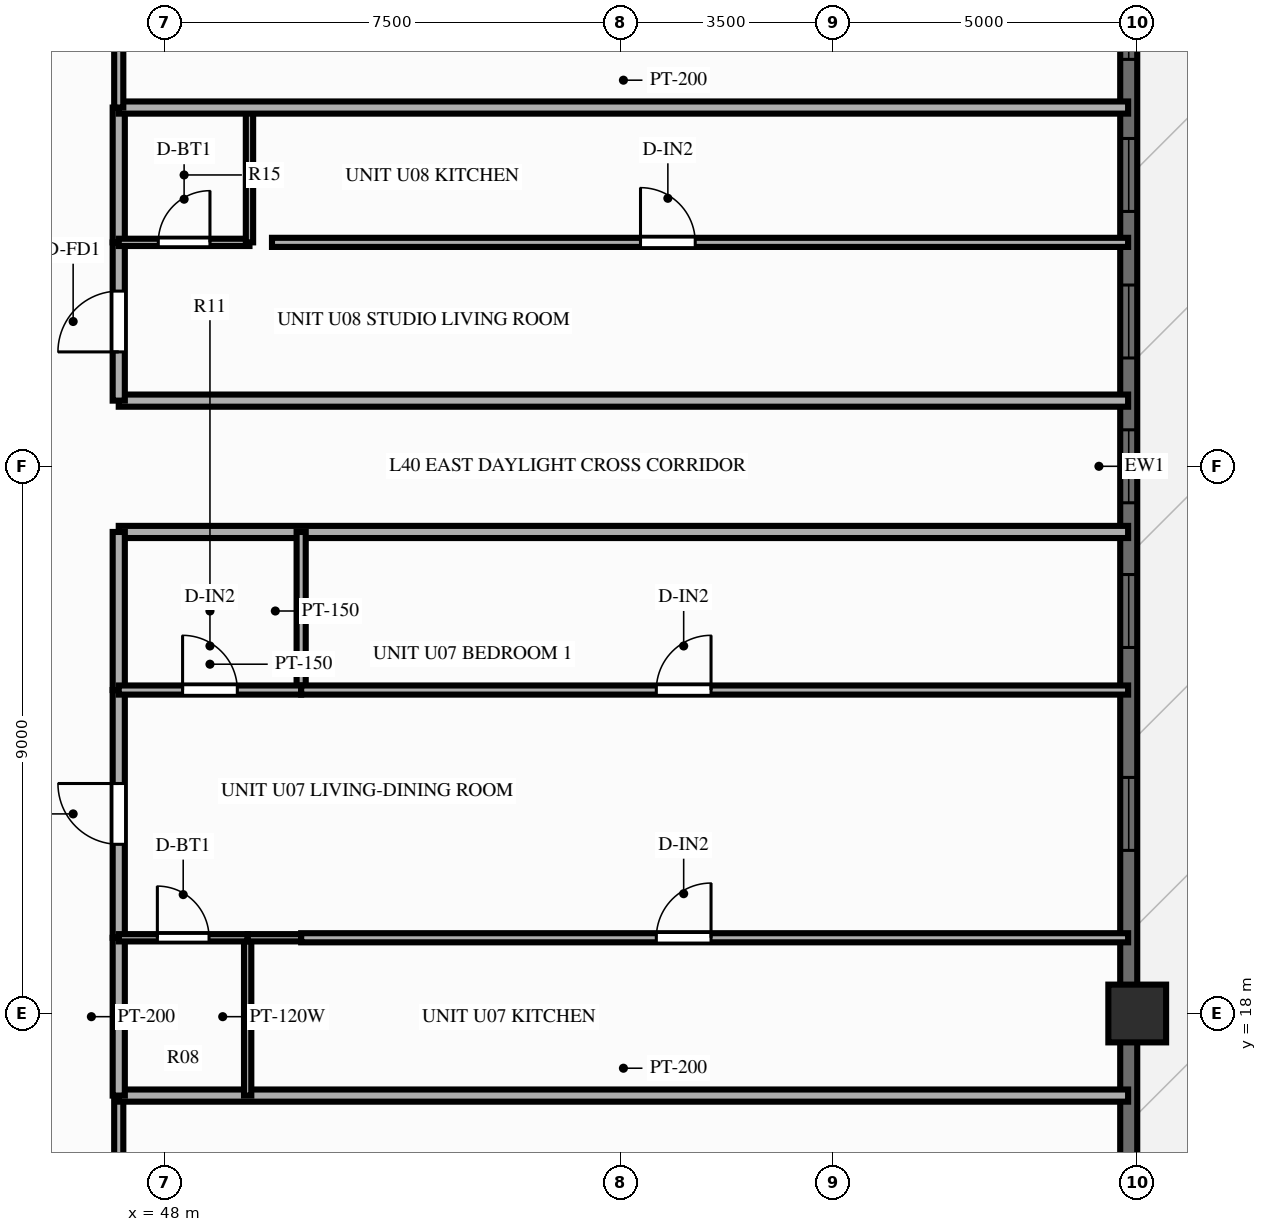
"""IFC4 building model, lengths in metres.
Left out: names, types, materials, properties, quantities, classifications, styles, units other than length and angle.
Written with IfcOpenShell. Run it as: python <this file> out.ifc"""

import sys

from ifc_helpers import new_model, si_unit, direction, frame, frame_2d, origin, origin_2d, place, context, subcontext, project, spatial, rectangle, extrude, source, transform, mapped, element, fill, save


model = new_model("IFC4")
c1 = context("Model", 3, precision=1e-05, world=origin(), true_north=direction((0.0, 1.0)))
c2 = subcontext(c1, "Body", "Model", "MODEL_VIEW")
j1 = project(units=[si_unit("LENGTHUNIT", "METRE"), si_unit("PLANEANGLEUNIT", "RADIAN")], contexts=[c1])
p1 = place(None, origin())
s1 = spatial("IfcSite", under=j1, at=p1, CompositionType="ELEMENT")
p2 = place(p1, origin())
s2 = spatial("IfcBuilding", under=s1, at=p2, CompositionType="ELEMENT")
p3 = place(p2, frame((0.0, 0.0, 126.75)))
s3 = spatial("IfcBuildingStorey", under=s2, at=p3, CompositionType="ELEMENT", Elevation=126.75)
m1 = source(origin(), c2, "Body", "SweptSolid", [
    extrude(rectangle(XDim=0.95, YDim=0.95, at=origin_2d()), origin(), (0.0, 0.0, 1.0), 3.0),
])
p4 = place(p3, frame((64.0, 18.0, 0.0), z_axis=(0.0, 0.0, 1.0), x_axis=(1.0, 0.0, 0.0)))
e1 = element("IfcColumn", 1, at=p4, inside=s3, PredefinedType="COLUMN", context=c2, shape_type="MappedRepresentation", body=[
    mapped(m1, transform((0.0, 0.0, 0.0), scale=1.0)),
])
p5 = place(p3, frame((63.86, 7.2, 0.0), z_axis=(0.0, 0.0, 1.0), x_axis=(0.0, 1.0, 0.0)))
e2 = element("IfcWall", 2, at=p5, inside=s3, PredefinedType="SOLIDWALL", context=c2, shape_type="SweptSolid", body=[
    extrude(rectangle(XDim=39.6, YDim=0.28, at=frame_2d((19.8, 0.0))), origin(), (0.0, 0.0, 1.0), 2.28),
])
p6 = place(p5, frame((5.683, 0.0, 0.0), z_axis=(0.0, 0.0, 1.0), x_axis=(-1.0, 0.0, 0.0)))
e3 = element("IfcOpeningElement", 3, at=p6, cuts=e2, PredefinedType="OPENING", context=c2, shape_type="SweptSolid", body=[
    extrude(rectangle(XDim=1.6, YDim=2.15, at=frame_2d((0.8, 1.075))), frame((0.0, 0.152, 0.0), z_axis=(0.0, -1.0, 0.0), x_axis=(1.0, 0.0, 0.0)), (0.0, 0.0, 1.0), 0.304),
])
p7 = place(p5, frame((13.483, 0.0, 0.25)))
e4 = element("IfcOpeningElement", 4, at=p7, cuts=e2, PredefinedType="OPENING", context=c2, shape_type="SweptSolid", body=[
    extrude(rectangle(XDim=1.2, YDim=1.5, at=frame_2d((0.6, 0.75))), frame((0.0, 0.152, 0.0), z_axis=(0.0, -1.0, 0.0), x_axis=(1.0, 0.0, 0.0)), (0.0, 0.0, 1.0), 0.304),
])
p8 = place(p5, frame((16.82, 0.0, 0.25)))
e5 = element("IfcOpeningElement", 5, at=p8, cuts=e2, PredefinedType="OPENING", context=c2, shape_type="SweptSolid", body=[
    extrude(rectangle(XDim=1.2, YDim=1.5, at=frame_2d((0.6, 0.75))), frame((0.0, 0.152, 0.0), z_axis=(0.0, -1.0, 0.0), x_axis=(1.0, 0.0, 0.0)), (0.0, 0.0, 1.0), 0.304),
])
p9 = place(p5, frame((19.2, 0.0, 0.25)))
e6 = element("IfcOpeningElement", 6, at=p9, cuts=e2, PredefinedType="OPENING", context=c2, shape_type="SweptSolid", body=[
    extrude(rectangle(XDim=1.2, YDim=1.5, at=frame_2d((0.6, 0.75))), frame((0.0, 0.152, 0.0), z_axis=(0.0, -1.0, 0.0), x_axis=(1.0, 0.0, 0.0)), (0.0, 0.0, 1.0), 0.304),
])
p10 = place(p5, frame((21.582, 0.0, 0.25)))
e7 = element("IfcOpeningElement", 7, at=p10, cuts=e2, PredefinedType="OPENING", context=c2, shape_type="SweptSolid", body=[
    extrude(rectangle(XDim=1.2, YDim=1.5, at=frame_2d((0.6, 0.75))), frame((0.0, 0.152, 0.0), z_axis=(0.0, -1.0, 0.0), x_axis=(1.0, 0.0, 0.0)), (0.0, 0.0, 1.0), 0.304),
])
p11 = place(p5, frame((23.992, 0.0, 0.25)))
e8 = element("IfcOpeningElement", 8, at=p11, cuts=e2, PredefinedType="OPENING", context=c2, shape_type="SweptSolid", body=[
    extrude(rectangle(XDim=1.2, YDim=1.5, at=frame_2d((0.6, 0.75))), frame((0.0, 0.152, 0.0), z_axis=(0.0, -1.0, 0.0), x_axis=(1.0, 0.0, 0.0)), (0.0, 0.0, 1.0), 0.304),
])
p12 = place(p5, frame((26.493, 0.0, 0.25)))
e9 = element("IfcOpeningElement", 9, at=p12, cuts=e2, PredefinedType="OPENING", context=c2, shape_type="SweptSolid", body=[
    extrude(rectangle(XDim=1.2, YDim=1.5, at=frame_2d((0.6, 0.75))), frame((0.0, 0.152, 0.0), z_axis=(0.0, -1.0, 0.0), x_axis=(1.0, 0.0, 0.0)), (0.0, 0.0, 1.0), 0.304),
])
p13 = place(p5, frame((29.468, 0.0, 0.25)))
e10 = element("IfcOpeningElement", 10, at=p13, cuts=e2, PredefinedType="OPENING", context=c2, shape_type="SweptSolid", body=[
    extrude(rectangle(XDim=0.7, YDim=1.5, at=frame_2d((0.35, 0.75))), frame((0.0, 0.152, 0.0), z_axis=(0.0, -1.0, 0.0), x_axis=(1.0, 0.0, 0.0)), (0.0, 0.0, 1.0), 0.304),
])
p14 = place(p5, frame((30.996, 0.0, 0.25)))
e11 = element("IfcOpeningElement", 11, at=p14, cuts=e2, PredefinedType="OPENING", context=c2, shape_type="SweptSolid", body=[
    extrude(rectangle(XDim=1.2, YDim=1.5, at=frame_2d((0.6, 0.75))), frame((0.0, 0.152, 0.0), z_axis=(0.0, -1.0, 0.0), x_axis=(1.0, 0.0, 0.0)), (0.0, 0.0, 1.0), 0.304),
])
p15 = place(p5, frame((33.221, 0.0, 0.25)))
e12 = element("IfcOpeningElement", 12, at=p15, cuts=e2, PredefinedType="OPENING", context=c2, shape_type="SweptSolid", body=[
    extrude(rectangle(XDim=1.2, YDim=1.5, at=frame_2d((0.6, 0.75))), frame((0.0, 0.152, 0.0), z_axis=(0.0, -1.0, 0.0), x_axis=(1.0, 0.0, 0.0)), (0.0, 0.0, 1.0), 0.304),
])
p16 = place(p5, frame((36.528, 0.0, 0.25)))
e13 = element("IfcOpeningElement", 13, at=p16, cuts=e2, PredefinedType="OPENING", context=c2, shape_type="SweptSolid", body=[
    extrude(rectangle(XDim=1.2, YDim=1.5, at=frame_2d((0.6, 0.75))), frame((0.0, 0.152, 0.0), z_axis=(0.0, -1.0, 0.0), x_axis=(1.0, 0.0, 0.0)), (0.0, 0.0, 1.0), 0.304),
])
p17 = place(p3, frame((47.25, 25.92, 0.0), z_axis=(0.0, 0.0, 1.0), x_axis=(1.0, 0.0, 0.0)))
e14 = element("IfcWall", 14, at=p17, inside=s3, PredefinedType="PARTITIONING", context=c2, shape_type="SweptSolid", body=[
    extrude(rectangle(XDim=16.6, YDim=0.2, at=frame_2d((8.3, 0.0))), origin(), (0.0, 0.0, 1.0), 2.79),
])
p18 = place(p3, frame((47.25, 7.38, 0.0), z_axis=(0.0, 0.0, 1.0), x_axis=(0.0, 1.0, 0.0)))
e15 = element("IfcWall", 15, at=p18, inside=s3, PredefinedType="PARTITIONING", context=c2, shape_type="SweptSolid", body=[
    extrude(rectangle(XDim=9.27, YDim=0.15, at=frame_2d((4.635, 0.0))), origin(), (0.0, 0.0, 1.0), 2.79),
])
p19 = place(p18, frame((4.085, 0.0, 0.0)))
e16 = element("IfcOpeningElement", 16, at=p19, cuts=e15, PredefinedType="OPENING", context=c2, shape_type="SweptSolid", body=[
    extrude(rectangle(XDim=1.1, YDim=2.15, at=frame_2d((0.55, 1.075))), frame((0.0, 0.087, 0.0), z_axis=(0.0, -1.0, 0.0), x_axis=(1.0, 0.0, 0.0)), (0.0, 0.0, 1.0), 0.174),
])
p20 = place(p3, frame((47.25, 16.65, 0.0), z_axis=(0.0, 0.0, 1.0), x_axis=(1.0, 0.0, 0.0)))
e17 = element("IfcWall", 17, at=p20, inside=s3, PredefinedType="PARTITIONING", context=c2, shape_type="SweptSolid", body=[
    extrude(rectangle(XDim=16.6, YDim=0.2, at=frame_2d((8.3, 0.0))), origin(), (0.0, 0.0, 1.0), 2.79),
])
p21 = place(p3, frame((47.25, 16.65, 0.0), z_axis=(0.0, 0.0, 1.0), x_axis=(0.0, 1.0, 0.0)))
e18 = element("IfcWall", 18, at=p21, inside=s3, PredefinedType="PARTITIONING", context=c2, shape_type="SweptSolid", body=[
    extrude(rectangle(XDim=2.596, YDim=0.2, at=frame_2d((1.298, 0.0))), origin(), (0.0, 0.0, 1.0), 2.79),
])
p22 = place(p3, frame((47.25, 19.246, 0.0), z_axis=(0.0, 0.0, 1.0), x_axis=(0.0, 1.0, 0.0)))
e19 = element("IfcWall", 19, at=p22, inside=s3, PredefinedType="PARTITIONING", context=c2, shape_type="SweptSolid", body=[
    extrude(rectangle(XDim=4.074, YDim=0.2, at=frame_2d((2.037, 0.0))), origin(), (0.0, 0.0, 1.0), 2.79),
])
p23 = place(p22, frame((1.537, 0.0, 0.0)))
e20 = element("IfcOpeningElement", 20, at=p23, cuts=e19, PredefinedType="OPENING", context=c2, shape_type="SweptSolid", body=[
    extrude(rectangle(XDim=1.0, YDim=2.15, at=frame_2d((0.5, 1.075))), frame((0.0, 0.112, 0.0), z_axis=(0.0, -1.0, 0.0), x_axis=(1.0, 0.0, 0.0)), (0.0, 0.0, 1.0), 0.224),
])
p24 = place(p3, frame((47.25, 23.32, 0.0), z_axis=(0.0, 0.0, 1.0), x_axis=(0.0, 1.0, 0.0)))
e21 = element("IfcWall", 21, at=p24, inside=s3, PredefinedType="PARTITIONING", context=c2, shape_type="SweptSolid", body=[
    extrude(rectangle(XDim=2.6, YDim=0.2, at=frame_2d((1.3, 0.0))), origin(), (0.0, 0.0, 1.0), 2.79),
])
p25 = place(p3, frame((49.37, 16.65, 0.0), z_axis=(0.0, 0.0, 1.0), x_axis=(0.0, 1.0, 0.0)))
e22 = element("IfcWall", 22, at=p25, inside=s3, PredefinedType="PARTITIONING", context=c2, shape_type="SweptSolid", body=[
    extrude(rectangle(XDim=2.596, YDim=0.12, at=frame_2d((1.298, 0.0))), origin(), (0.0, 0.0, 1.0), 2.79),
])
p26 = place(p3, frame((50.25, 23.32, 0.0), z_axis=(0.0, 0.0, 1.0), x_axis=(0.0, 1.0, 0.0)))
e23 = element("IfcWall", 23, at=p26, inside=s3, PredefinedType="PARTITIONING", context=c2, shape_type="SweptSolid", body=[
    extrude(rectangle(XDim=2.6, YDim=0.15, at=frame_2d((1.3, 0.0))), origin(), (0.0, 0.0, 1.0), 2.79),
])
p27 = place(p3, frame((47.25, 19.246, 0.0), z_axis=(0.0, 0.0, 1.0), x_axis=(1.0, 0.0, 0.0)))
e24 = element("IfcWall", 24, at=p27, inside=s3, PredefinedType="PARTITIONING", context=c2, shape_type="SweptSolid", body=[
    extrude(rectangle(XDim=2.12, YDim=0.12, at=frame_2d((1.06, 0.0))), origin(), (0.0, 0.0, 1.0), 2.79),
])
p28 = place(p27, frame((0.635, 0.0, 0.0)))
e25 = element("IfcOpeningElement", 25, at=p28, cuts=e24, PredefinedType="OPENING", context=c2, shape_type="SweptSolid", body=[
    extrude(rectangle(XDim=0.85, YDim=2.05, at=frame_2d((0.425, 1.025))), frame((0.0, 0.072, 0.0), z_axis=(0.0, -1.0, 0.0), x_axis=(1.0, 0.0, 0.0)), (0.0, 0.0, 1.0), 0.144),
])
p29 = place(p3, frame((49.37, 19.246, 0.0), z_axis=(0.0, 0.0, 1.0), x_axis=(1.0, 0.0, 0.0)))
e26 = element("IfcWall", 26, at=p29, inside=s3, PredefinedType="PARTITIONING", context=c2, shape_type="SweptSolid", body=[
    extrude(rectangle(XDim=0.88, YDim=0.12, at=frame_2d((0.44, 0.0))), origin(), (0.0, 0.0, 1.0), 2.79),
])
p30 = place(p3, frame((50.25, 19.246, 0.0), z_axis=(0.0, 0.0, 1.0), x_axis=(1.0, 0.0, 0.0)))
e27 = element("IfcWall", 27, at=p30, inside=s3, PredefinedType="PARTITIONING", context=c2, shape_type="SweptSolid", body=[
    extrude(rectangle(XDim=13.6, YDim=0.15, at=frame_2d((6.8, 0.0))), origin(), (0.0, 0.0, 1.0), 2.79),
])
p31 = place(p30, frame((5.841, 0.0, 0.0)))
e28 = element("IfcOpeningElement", 28, at=p31, cuts=e27, PredefinedType="OPENING", context=c2, shape_type="SweptSolid", body=[
    extrude(rectangle(XDim=0.9, YDim=2.1, at=frame_2d((0.45, 1.05))), frame((0.0, 0.087, 0.0), z_axis=(0.0, -1.0, 0.0), x_axis=(1.0, 0.0, 0.0)), (0.0, 0.0, 1.0), 0.174),
])
p32 = place(p3, frame((47.25, 23.32, 0.0), z_axis=(0.0, 0.0, 1.0), x_axis=(1.0, 0.0, 0.0)))
e29 = element("IfcWall", 29, at=p32, inside=s3, PredefinedType="PARTITIONING", context=c2, shape_type="SweptSolid", body=[
    extrude(rectangle(XDim=3.0, YDim=0.15, at=frame_2d((1.5, 0.0))), origin(), (0.0, 0.0, 1.0), 2.79),
])
p33 = place(p32, frame((1.05, 0.0, 0.0)))
e30 = element("IfcOpeningElement", 30, at=p33, cuts=e29, PredefinedType="OPENING", context=c2, shape_type="SweptSolid", body=[
    extrude(rectangle(XDim=0.9, YDim=2.1, at=frame_2d((0.45, 1.05))), frame((0.0, 0.087, 0.0), z_axis=(0.0, -1.0, 0.0), x_axis=(1.0, 0.0, 0.0)), (0.0, 0.0, 1.0), 0.174),
])
p34 = place(p3, frame((50.25, 23.32, 0.0), z_axis=(0.0, 0.0, 1.0), x_axis=(1.0, 0.0, 0.0)))
e31 = element("IfcWall", 31, at=p34, inside=s3, PredefinedType="PARTITIONING", context=c2, shape_type="SweptSolid", body=[
    extrude(rectangle(XDim=13.6, YDim=0.15, at=frame_2d((6.8, 0.0))), origin(), (0.0, 0.0, 1.0), 2.79),
])
p35 = place(p34, frame((5.841, 0.0, 0.0)))
e32 = element("IfcOpeningElement", 32, at=p35, cuts=e31, PredefinedType="OPENING", context=c2, shape_type="SweptSolid", body=[
    extrude(rectangle(XDim=0.9, YDim=2.1, at=frame_2d((0.45, 1.05))), frame((0.0, 0.087, 0.0), z_axis=(0.0, -1.0, 0.0), x_axis=(1.0, 0.0, 0.0)), (0.0, 0.0, 1.0), 0.174),
])
p36 = place(p3, frame((47.25, 28.08, 0.0), z_axis=(0.0, 0.0, 1.0), x_axis=(1.0, 0.0, 0.0)))
e33 = element("IfcWall", 33, at=p36, inside=s3, PredefinedType="PARTITIONING", context=c2, shape_type="SweptSolid", body=[
    extrude(rectangle(XDim=16.6, YDim=0.2, at=frame_2d((8.3, 0.0))), origin(), (0.0, 0.0, 1.0), 2.79),
])
p37 = place(p3, frame((47.25, 28.08, 0.0), z_axis=(0.0, 0.0, 1.0), x_axis=(0.0, 1.0, 0.0)))
e34 = element("IfcWall", 34, at=p37, inside=s3, PredefinedType="PARTITIONING", context=c2, shape_type="SweptSolid", body=[
    extrude(rectangle(XDim=2.603, YDim=0.2, at=frame_2d((1.302, 0.0))), origin(), (0.0, 0.0, 1.0), 2.79),
])
p38 = place(p37, frame((0.802, 0.0, 0.0)))
e35 = element("IfcOpeningElement", 35, at=p38, cuts=e34, PredefinedType="OPENING", context=c2, shape_type="SweptSolid", body=[
    extrude(rectangle(XDim=1.0, YDim=2.15, at=frame_2d((0.5, 1.075))), frame((0.0, 0.112, 0.0), z_axis=(0.0, -1.0, 0.0), x_axis=(1.0, 0.0, 0.0)), (0.0, 0.0, 1.0), 0.224),
])
p39 = place(p3, frame((47.25, 30.683, 0.0), z_axis=(0.0, 0.0, 1.0), x_axis=(0.0, 1.0, 0.0)))
e36 = element("IfcWall", 36, at=p39, inside=s3, PredefinedType="PARTITIONING", context=c2, shape_type="SweptSolid", body=[
    extrude(rectangle(XDim=2.217, YDim=0.2, at=frame_2d((1.109, 0.0))), origin(), (0.0, 0.0, 1.0), 2.79),
])
p40 = place(p3, frame((47.25, 30.683, 0.0), z_axis=(0.0, 0.0, 1.0), x_axis=(1.0, 0.0, 0.0)))
e37 = element("IfcWall", 37, at=p40, inside=s3, PredefinedType="PARTITIONING", context=c2, shape_type="SweptSolid", body=[
    extrude(rectangle(XDim=2.15, YDim=0.12, at=frame_2d((1.075, 0.0))), origin(), (0.0, 0.0, 1.0), 2.79),
])
p41 = place(p40, frame((0.65, 0.0, 0.0)))
e38 = element("IfcOpeningElement", 38, at=p41, cuts=e37, PredefinedType="OPENING", context=c2, shape_type="SweptSolid", body=[
    extrude(rectangle(XDim=0.85, YDim=2.05, at=frame_2d((0.425, 1.025))), frame((0.0, 0.072, 0.0), z_axis=(0.0, -1.0, 0.0), x_axis=(1.0, 0.0, 0.0)), (0.0, 0.0, 1.0), 0.144),
])
p42 = place(p3, frame((49.4, 30.683, 0.0), z_axis=(0.0, 0.0, 1.0), x_axis=(0.0, 1.0, 0.0)))
e39 = element("IfcWall", 39, at=p42, inside=s3, PredefinedType="PARTITIONING", context=c2, shape_type="SweptSolid", body=[
    extrude(rectangle(XDim=2.217, YDim=0.12, at=frame_2d((1.109, 0.0))), origin(), (0.0, 0.0, 1.0), 2.79),
])
p43 = place(p3, frame((49.77, 30.683, 0.0), z_axis=(0.0, 0.0, 1.0), x_axis=(1.0, 0.0, 0.0)))
e40 = element("IfcWall", 40, at=p43, inside=s3, PredefinedType="PARTITIONING", context=c2, shape_type="SweptSolid", body=[
    extrude(rectangle(XDim=14.08, YDim=0.15, at=frame_2d((7.04, 0.0))), origin(), (0.0, 0.0, 1.0), 2.79),
])
p44 = place(p43, frame((6.061, 0.0, 0.0)))
e41 = element("IfcOpeningElement", 41, at=p44, cuts=e40, PredefinedType="OPENING", context=c2, shape_type="SweptSolid", body=[
    extrude(rectangle(XDim=0.9, YDim=2.1, at=frame_2d((0.45, 1.05))), frame((0.0, 0.087, 0.0), z_axis=(0.0, -1.0, 0.0), x_axis=(1.0, 0.0, 0.0)), (0.0, 0.0, 1.0), 0.174),
])
p45 = place(p3, frame((47.25, 32.9, 0.0), z_axis=(0.0, 0.0, 1.0), x_axis=(1.0, 0.0, 0.0)))
e42 = element("IfcWall", 42, at=p45, inside=s3, PredefinedType="PARTITIONING", context=c2, shape_type="SweptSolid", body=[
    extrude(rectangle(XDim=16.6, YDim=0.2, at=frame_2d((8.3, 0.0))), origin(), (0.0, 0.0, 1.0), 2.79),
])
p46 = place(p3, frame((47.25, 32.9, 0.0), z_axis=(0.0, 0.0, 1.0), x_axis=(0.0, 1.0, 0.0)))
e43 = element("IfcWall", 43, at=p46, inside=s3, PredefinedType="PARTITIONING", context=c2, shape_type="SweptSolid", body=[
    extrude(rectangle(XDim=4.82, YDim=0.15, at=frame_2d((2.41, 0.0))), origin(), (0.0, 0.0, 1.0), 2.79),
])
p47 = place(p46, frame((1.86, 0.0, 0.0)))
e44 = element("IfcOpeningElement", 44, at=p47, cuts=e43, PredefinedType="OPENING", context=c2, shape_type="SweptSolid", body=[
    extrude(rectangle(XDim=1.1, YDim=2.15, at=frame_2d((0.55, 1.075))), frame((0.0, 0.087, 0.0), z_axis=(0.0, -1.0, 0.0), x_axis=(1.0, 0.0, 0.0)), (0.0, 0.0, 1.0), 0.174),
])
m2 = source(origin(), c2, "Body", "SweptSolid", [
    extrude(rectangle(XDim=1.2, YDim=1.5, at=frame_2d((0.6, 0.75))), frame((0.0, 0.03, 0.0), z_axis=(0.0, -1.0, 0.0), x_axis=(1.0, 0.0, 0.0)), (0.0, 0.0, 1.0), 0.06),
])
p48 = place(p7, origin())
e45 = element("IfcWindow", 45, at=p48, inside=s3, PartitioningType="SINGLE_PANEL", PredefinedType="WINDOW", context=c2, shape_type="MappedRepresentation", body=[
    mapped(m2, transform((0.0, 0.0, 0.0), scale=1.0)),
])
fill(e4, e45)
p49 = place(p8, origin())
e46 = element("IfcWindow", 46, at=p49, inside=s3, PartitioningType="SINGLE_PANEL", PredefinedType="WINDOW", context=c2, shape_type="MappedRepresentation", body=[
    mapped(m2, transform((0.0, 0.0, 0.0), scale=1.0)),
])
fill(e5, e46)
p50 = place(p9, origin())
e47 = element("IfcWindow", 47, at=p50, inside=s3, PartitioningType="SINGLE_PANEL", PredefinedType="WINDOW", context=c2, shape_type="MappedRepresentation", body=[
    mapped(m2, transform((0.0, 0.0, 0.0), scale=1.0)),
])
fill(e6, e47)
p51 = place(p10, origin())
e48 = element("IfcWindow", 48, at=p51, inside=s3, PartitioningType="SINGLE_PANEL", PredefinedType="WINDOW", context=c2, shape_type="MappedRepresentation", body=[
    mapped(m2, transform((0.0, 0.0, 0.0), scale=1.0)),
])
fill(e7, e48)
p52 = place(p11, origin())
e49 = element("IfcWindow", 49, at=p52, inside=s3, PartitioningType="SINGLE_PANEL", PredefinedType="WINDOW", context=c2, shape_type="MappedRepresentation", body=[
    mapped(m2, transform((0.0, 0.0, 0.0), scale=1.0)),
])
fill(e8, e49)
p53 = place(p12, origin())
e50 = element("IfcWindow", 50, at=p53, inside=s3, PartitioningType="SINGLE_PANEL", PredefinedType="WINDOW", context=c2, shape_type="MappedRepresentation", body=[
    mapped(m2, transform((0.0, 0.0, 0.0), scale=1.0)),
])
fill(e9, e50)
m3 = source(origin(), c2, "Body", "SweptSolid", [
    extrude(rectangle(XDim=1.0, YDim=2.15, at=frame_2d((0.5, 1.075))), frame((0.0, 0.025, 0.0), z_axis=(0.0, -1.0, 0.0), x_axis=(1.0, 0.0, 0.0)), (0.0, 0.0, 1.0), 0.05),
])
p54 = place(p23, origin())
e51 = element("IfcDoor", 51, at=p54, inside=s3, OperationType="SINGLE_SWING_RIGHT", PredefinedType="DOOR", context=c2, shape_type="MappedRepresentation", body=[
    mapped(m3, transform((0.0, 0.0, 0.0), scale=1.0)),
])
fill(e20, e51)
m4 = source(origin(), c2, "Body", "SweptSolid", [
    extrude(rectangle(XDim=0.85, YDim=2.05, at=frame_2d((0.425, 1.025))), frame((0.0, 0.025, 0.0), z_axis=(0.0, -1.0, 0.0), x_axis=(1.0, 0.0, 0.0)), (0.0, 0.0, 1.0), 0.05),
])
p55 = place(p28, origin())
e52 = element("IfcDoor", 52, at=p55, inside=s3, OperationType="SINGLE_SWING_LEFT", PredefinedType="DOOR", context=c2, shape_type="MappedRepresentation", body=[
    mapped(m4, transform((0.0, 0.0, 0.0), scale=1.0)),
])
fill(e25, e52)
m5 = source(origin(), c2, "Body", "SweptSolid", [
    extrude(rectangle(XDim=0.9, YDim=2.1, at=frame_2d((0.45, 1.05))), frame((0.0, 0.025, 0.0), z_axis=(0.0, -1.0, 0.0), x_axis=(1.0, 0.0, 0.0)), (0.0, 0.0, 1.0), 0.05),
])
p56 = place(p31, origin())
e53 = element("IfcDoor", 53, at=p56, inside=s3, OperationType="SINGLE_SWING_RIGHT", PredefinedType="DOOR", context=c2, shape_type="MappedRepresentation", body=[
    mapped(m5, transform((0.0, 0.0, 0.0), scale=1.0)),
])
fill(e28, e53)
p57 = place(p33, origin())
e54 = element("IfcDoor", 54, at=p57, inside=s3, OperationType="SINGLE_SWING_LEFT", PredefinedType="DOOR", context=c2, shape_type="MappedRepresentation", body=[
    mapped(m5, transform((0.0, 0.0, 0.0), scale=1.0)),
])
fill(e30, e54)
p58 = place(p35, origin())
e55 = element("IfcDoor", 55, at=p58, inside=s3, OperationType="SINGLE_SWING_RIGHT", PredefinedType="DOOR", context=c2, shape_type="MappedRepresentation", body=[
    mapped(m5, transform((0.0, 0.0, 0.0), scale=1.0)),
])
fill(e32, e55)
p59 = place(p38, origin())
e56 = element("IfcDoor", 56, at=p59, inside=s3, OperationType="SINGLE_SWING_LEFT", PredefinedType="DOOR", context=c2, shape_type="MappedRepresentation", body=[
    mapped(m3, transform((0.0, 0.0, 0.0), scale=1.0)),
])
fill(e35, e56)
p60 = place(p41, origin())
e57 = element("IfcDoor", 57, at=p60, inside=s3, OperationType="SINGLE_SWING_RIGHT", PredefinedType="DOOR", context=c2, shape_type="MappedRepresentation", body=[
    mapped(m4, transform((0.0, 0.0, 0.0), scale=1.0)),
])
fill(e38, e57)
p61 = place(p44, origin())
e58 = element("IfcDoor", 58, at=p61, inside=s3, OperationType="SINGLE_SWING_LEFT", PredefinedType="DOOR", context=c2, shape_type="MappedRepresentation", body=[
    mapped(m5, transform((0.0, 0.0, 0.0), scale=1.0)),
])
fill(e41, e58)
save(model, sys.argv[1])
